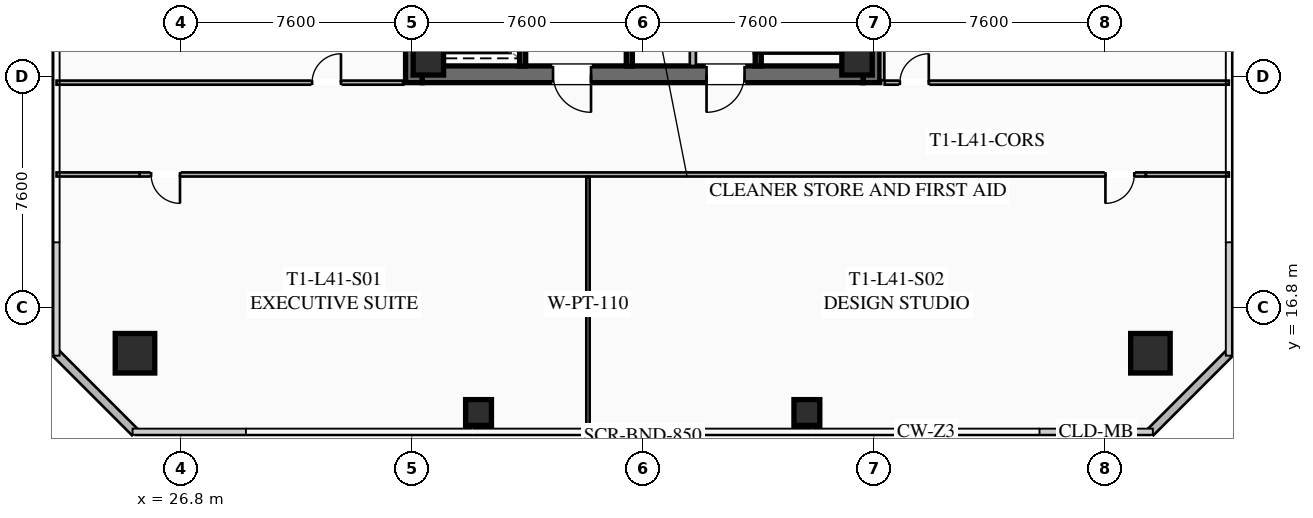
"""IFC4 building model, lengths in metres.
Left out: names, types, materials, properties, quantities, classifications, styles, units other than length and angle.
Written with IfcOpenShell. Run it as: python <this file> out.ifc"""

import sys

from ifc_helpers import new_model, si_unit, direction, frame, frame_2d, origin, origin_2d, place, context, subcontext, project, spatial, rectangle, hollow_rectangle, extrude, element, fill, save


model = new_model("IFC4")
c1 = context("Model", 3, precision=1e-05, world=origin(), true_north=direction((0.0, 1.0)))
c2 = subcontext(c1, "Body", "Model", "MODEL_VIEW")
j1 = project(units=[si_unit("LENGTHUNIT", "METRE"), si_unit("PLANEANGLEUNIT", "RADIAN")], contexts=[c1])
p1 = place(None, origin())
s1 = spatial("IfcSite", under=j1, at=p1, CompositionType="ELEMENT")
p2 = place(p1, origin())
s2 = spatial("IfcBuilding", under=s1, at=p2, CompositionType="ELEMENT")
p3 = place(p2, frame((0.0, 0.0, 153.45)))
s3 = spatial("IfcBuildingStorey", under=s2, at=p3, CompositionType="ELEMENT", Elevation=153.45)
for number, where, z_axis, x_axis in (
    (1, (34.475, 24.2, 0.0), (0.0, 0.0, 1.0), (0.0, 1.0, 0.0)),
    (2, (49.525, 39.8, 0.0), (0.0, 0.0, 1.0), (0.0, -1.0, 0.0)),
):
    element("IfcWall", number, at=place(p3, frame(where, z_axis=z_axis, x_axis=x_axis)), inside=s3, PredefinedType="SHEAR", context=c2, shape_type="SweptSolid", body=[
        extrude(rectangle(XDim=15.6, YDim=0.55, at=frame_2d((7.8, 0.0))), origin(), (0.0, 0.0, 1.0), 3.55),
    ])
p4 = place(p3, frame((49.25, 24.475, 0.0), z_axis=(0.0, 0.0, 1.0), x_axis=(-1.0, 0.0, 0.0)))
e3 = element("IfcWall", 3, at=p4, inside=s3, PredefinedType="SHEAR", context=c2, shape_type="SweptSolid", body=[
    extrude(rectangle(XDim=14.5, YDim=0.55, at=frame_2d((7.25, 0.0))), origin(), (0.0, 0.0, 1.0), 3.55),
])
p5 = place(p4, frame((8.95, 0.0, 0.0)))
e4 = element("IfcOpeningElement", 4, at=p5, cuts=e3, PredefinedType="OPENING", context=c2, shape_type="SweptSolid", body=[
    extrude(rectangle(XDim=1.25, YDim=2.25, at=frame_2d((0.625, 1.125))), frame((0.0, 0.285, 0.0), z_axis=(0.0, -1.0, 0.0), x_axis=(1.0, 0.0, 0.0)), (0.0, 0.0, 1.0), 0.57),
])
p6 = place(p4, frame((3.9, 0.0, 0.0)))
e5 = element("IfcOpeningElement", 5, at=p6, cuts=e3, PredefinedType="OPENING", context=c2, shape_type="SweptSolid", body=[
    extrude(rectangle(XDim=1.25, YDim=2.25, at=frame_2d((0.625, 1.125))), frame((0.0, 0.285, 0.0), z_axis=(0.0, -1.0, 0.0), x_axis=(1.0, 0.0, 0.0)), (0.0, 0.0, 1.0), 0.57),
])
for number, where, z_axis, x_axis in (
    (6, (34.95, 24.95, 0.0), (0.0, 0.0, 1.0), (1.0, 0.0, 0.0)),
    (7, (49.05, 24.95, 0.0), (0.0, 0.0, 1.0), (1.0, 0.0, 0.0)),
):
    element("IfcColumn", number, at=place(p3, frame(where, z_axis=z_axis, x_axis=x_axis)), inside=s3, PredefinedType="COLUMN", context=c2, shape_type="SweptSolid", body=[
        extrude(hollow_rectangle(XDim=1.0, YDim=1.0, WallThickness=0.04, at=origin_2d()), origin(), (0.0, 0.0, 1.0), 3.37),
    ])
for number, where, z_axis, x_axis in (
    (8, (25.3, 15.3, 0.0), (0.0, 0.0, 1.0), (1.0, 0.0, 0.0)),
    (9, (58.7, 15.3, 0.0), (0.0, 0.0, 1.0), (1.0, 0.0, 0.0)),
):
    element("IfcColumn", number, at=place(p3, frame(where, z_axis=z_axis, x_axis=x_axis)), inside=s3, PredefinedType="COLUMN", context=c2, shape_type="SweptSolid", body=[
        extrude(hollow_rectangle(XDim=1.3, YDim=1.3, WallThickness=0.05, at=origin_2d()), origin(), (0.0, 0.0, 1.0), 3.37),
    ])
for number, where, z_axis, x_axis in (
    (10, (36.6, 13.35, 0.0), (0.0, 0.0, 1.0), (1.0, 0.0, 0.0)),
    (11, (47.4, 13.35, 0.0), (0.0, 0.0, 1.0), (1.0, 0.0, 0.0)),
):
    element("IfcColumn", number, at=place(p3, frame(where, z_axis=z_axis, x_axis=x_axis)), inside=s3, PredefinedType="COLUMN", context=c2, shape_type="SweptSolid", body=[
        extrude(hollow_rectangle(XDim=0.85, YDim=0.85, WallThickness=0.035, at=origin_2d()), origin(), (0.0, 0.0, 1.0), 3.37),
    ])
for number, where, z_axis, x_axis in (
    (12, (25.3, 12.7, 0.0), (0.0, 0.0, 1.0), (-0.707, 0.707, 0.0)),
    (13, (61.3, 15.3, 0.0), (0.0, 0.0, 1.0), (-0.707, -0.707, 0.0)),
):
    element("IfcWall", number, at=place(p3, frame(where, z_axis=z_axis, x_axis=x_axis)), inside=s3, PredefinedType="SOLIDWALL", context=c2, shape_type="SweptSolid", body=[
        extrude(rectangle(XDim=3.677, YDim=0.28, at=frame_2d((1.838, 0.0))), origin(), (0.0, 0.0, 1.0), 3.37),
    ])
p7 = place(p3, frame((45.8, 32.8, 0.0), z_axis=(0.0, 0.0, 1.0), x_axis=(0.0, -1.0, 0.0)))
e14 = element("IfcWall", 14, at=p7, inside=s3, PredefinedType="SHEAR", context=c2, shape_type="SweptSolid", body=[
    extrude(rectangle(XDim=8.05, YDim=0.2, at=frame_2d((4.025, 0.0))), origin(), (0.0, 0.0, 1.0), 3.37),
])
p8 = place(p7, frame((0.45, 0.0, 0.0)))
e15 = element("IfcOpeningElement", 15, at=p8, cuts=e14, PredefinedType="OPENING", context=c2, shape_type="SweptSolid", body=[
    extrude(rectangle(XDim=1.15, YDim=2.2, at=frame_2d((0.575, 1.1))), frame((0.0, 0.11, 0.0), z_axis=(0.0, -1.0, 0.0), x_axis=(1.0, 0.0, 0.0)), (0.0, 0.0, 1.0), 0.22),
])
p9 = place(p3, frame((41.56, 24.75, 0.0), z_axis=(0.0, 0.0, 1.0), x_axis=(0.0, 1.0, 0.0)))
e16 = element("IfcWall", 16, at=p9, inside=s3, PredefinedType="SHEAR", context=c2, shape_type="SweptSolid", body=[
    extrude(rectangle(XDim=14.5, YDim=0.2, at=frame_2d((7.25, 0.0))), origin(), (0.0, 0.0, 1.0), 3.37),
])
p10 = place(p3, frame((38.05, 24.75, 0.0), z_axis=(0.0, 0.0, 1.0), x_axis=(0.0, 1.0, 0.0)))
e17 = element("IfcWall", 17, at=p10, inside=s3, PredefinedType="SHEAR", context=c2, shape_type="SweptSolid", body=[
    extrude(rectangle(XDim=6.45, YDim=0.2, at=frame_2d((3.225, 0.0))), origin(), (0.0, 0.0, 1.0), 3.37),
])
p11 = place(p10, frame((4.875, 0.0, 0.0)))
e18 = element("IfcOpeningElement", 18, at=p11, cuts=e17, PredefinedType="OPENING", context=c2, shape_type="SweptSolid", body=[
    extrude(rectangle(XDim=1.3, YDim=2.25, at=frame_2d((0.65, 1.125))), frame((0.0, 0.11, 0.0), z_axis=(0.0, -1.0, 0.0), x_axis=(1.0, 0.0, 0.0)), (0.0, 0.0, 1.0), 0.22),
])
p12 = place(p10, frame((2.875, 0.0, 0.0)))
e19 = element("IfcOpeningElement", 19, at=p12, cuts=e17, PredefinedType="OPENING", context=c2, shape_type="SweptSolid", body=[
    extrude(rectangle(XDim=1.3, YDim=2.25, at=frame_2d((0.65, 1.125))), frame((0.0, 0.11, 0.0), z_axis=(0.0, -1.0, 0.0), x_axis=(1.0, 0.0, 0.0)), (0.0, 0.0, 1.0), 0.22),
])
p13 = place(p10, frame((0.675, 0.0, 0.0)))
e20 = element("IfcOpeningElement", 20, at=p13, cuts=e17, PredefinedType="OPENING", context=c2, shape_type="SweptSolid", body=[
    extrude(rectangle(XDim=1.3, YDim=2.25, at=frame_2d((0.65, 1.125))), frame((0.0, 0.11, 0.0), z_axis=(0.0, -1.0, 0.0), x_axis=(1.0, 0.0, 0.0)), (0.0, 0.0, 1.0), 0.22),
])
p14 = place(p3, frame((43.65, 24.75, 0.0), z_axis=(0.0, 0.0, 1.0), x_axis=(0.0, 1.0, 0.0)))
e21 = element("IfcWall", 21, at=p14, inside=s3, PredefinedType="SOLIDWALL", context=c2, shape_type="SweptSolid", body=[
    extrude(rectangle(XDim=6.9, YDim=0.2, at=frame_2d((3.45, 0.0))), origin(), (0.0, 0.0, 1.0), 2.513),
])
p15 = place(p14, frame((0.85, 0.0, 0.0)))
e22 = element("IfcOpeningElement", 22, at=p15, cuts=e21, PredefinedType="OPENING", context=c2, shape_type="SweptSolid", body=[
    extrude(rectangle(XDim=0.95, YDim=2.05, at=frame_2d((0.475, 1.025))), frame((0.0, 0.11, 0.0), z_axis=(0.0, -1.0, 0.0), x_axis=(1.0, 0.0, 0.0)), (0.0, 0.0, 1.0), 0.22),
])
p16 = place(p14, frame((4.8, 0.0, 0.0)))
e23 = element("IfcOpeningElement", 23, at=p16, cuts=e21, PredefinedType="OPENING", context=c2, shape_type="SweptSolid", body=[
    extrude(rectangle(XDim=1.05, YDim=2.2, at=frame_2d((0.525, 1.1))), frame((0.0, 0.11, 0.0), z_axis=(0.0, -1.0, 0.0), x_axis=(1.0, 0.0, 0.0)), (0.0, 0.0, 1.0), 0.22),
])
p17 = place(p3, frame((58.55, 21.18, 0.0), z_axis=(0.0, 0.0, 1.0), x_axis=(-1.0, 0.0, 0.0)))
e24 = element("IfcWall", 24, at=p17, inside=s3, PredefinedType="PARTITIONING", context=c2, shape_type="SweptSolid", body=[
    extrude(rectangle(XDim=33.1, YDim=0.135, at=frame_2d((16.55, 0.0))), origin(), (0.0, 0.0, 1.0), 2.513),
])
p18 = place(p17, frame((31.77, 0.0, 0.0)))
e25 = element("IfcOpeningElement", 25, at=p18, cuts=e24, PredefinedType="OPENING", context=c2, shape_type="SweptSolid", body=[
    extrude(rectangle(XDim=0.95, YDim=2.05, at=frame_2d((0.475, 1.025))), frame((0.0, 0.077, 0.0), z_axis=(0.0, -1.0, 0.0), x_axis=(1.0, 0.0, 0.0)), (0.0, 0.0, 1.0), 0.155),
])
p19 = place(p17, frame((0.38, 0.0, 0.0)))
e26 = element("IfcOpeningElement", 26, at=p19, cuts=e24, PredefinedType="OPENING", context=c2, shape_type="SweptSolid", body=[
    extrude(rectangle(XDim=0.95, YDim=2.05, at=frame_2d((0.475, 1.025))), frame((0.0, 0.077, 0.0), z_axis=(0.0, -1.0, 0.0), x_axis=(1.0, 0.0, 0.0)), (0.0, 0.0, 1.0), 0.155),
])
for number, where, z_axis, x_axis in (
    (27, (22.72, 21.18, 0.0), (0.0, 0.0, 1.0), (1.0, 0.0, 0.0)),
    (28, (58.55, 21.18, 0.0), (0.0, 0.0, 1.0), (1.0, 0.0, 0.0)),
):
    element("IfcWall", number, at=place(p3, frame(where, z_axis=z_axis, x_axis=x_axis)), inside=s3, PredefinedType="PARTITIONING", context=c2, shape_type="SweptSolid", body=[
        extrude(rectangle(XDim=2.73, YDim=0.135, at=frame_2d((1.365, 0.0))), origin(), (0.0, 0.0, 1.0), 2.513),
    ])
p20 = place(p3, frame((40.2, 12.72, 0.0), z_axis=(0.0, 0.0, 1.0), x_axis=(0.0, 1.0, 0.0)))
e29 = element("IfcWall", 29, at=p20, inside=s3, PredefinedType="PARTITIONING", context=c2, shape_type="SweptSolid", body=[
    extrude(rectangle(XDim=8.38, YDim=0.11, at=frame_2d((4.19, 0.0))), origin(), (0.0, 0.0, 1.0), 2.513),
])
p21 = place(p3, frame((49.88, 39.72, 0.0), z_axis=(0.0, 0.0, 1.0), x_axis=(0.0, -1.0, 0.0)))
e30 = element("IfcWall", 30, at=p21, inside=s3, PredefinedType="PARTITIONING", context=c2, shape_type="SweptSolid", body=[
    extrude(rectangle(XDim=15.44, YDim=0.135, at=frame_2d((7.72, 0.0))), origin(), (0.0, 0.0, 1.0), 2.513),
])
p22 = place(p3, frame((49.96, 24.2, 0.0), z_axis=(0.0, 0.0, 1.0), x_axis=(1.0, 0.0, 0.0)))
e31 = element("IfcWall", 31, at=p22, inside=s3, PredefinedType="PARTITIONING", context=c2, shape_type="SweptSolid", body=[
    extrude(rectangle(XDim=11.32, YDim=0.135, at=frame_2d((5.66, 0.0))), origin(), (0.0, 0.0, 1.0), 2.513),
])
p23 = place(p22, frame((0.5, 0.0, 0.0)))
e32 = element("IfcOpeningElement", 32, at=p23, cuts=e31, PredefinedType="OPENING", context=c2, shape_type="SweptSolid", body=[
    extrude(rectangle(XDim=0.95, YDim=2.05, at=frame_2d((0.475, 1.025))), frame((0.0, 0.077, 0.0), z_axis=(0.0, -1.0, 0.0), x_axis=(1.0, 0.0, 0.0)), (0.0, 0.0, 1.0), 0.155),
])
p24 = place(p3, frame((22.72, 24.2, 0.0), z_axis=(0.0, 0.0, 1.0), x_axis=(1.0, 0.0, 0.0)))
e33 = element("IfcWall", 33, at=p24, inside=s3, PredefinedType="PARTITIONING", context=c2, shape_type="SweptSolid", body=[
    extrude(rectangle(XDim=11.4, YDim=0.135, at=frame_2d((5.7, 0.0))), origin(), (0.0, 0.0, 1.0), 2.513),
])
p25 = place(p24, frame((8.405, 0.0, 0.0)))
e34 = element("IfcOpeningElement", 34, at=p25, cuts=e33, PredefinedType="OPENING", context=c2, shape_type="SweptSolid", body=[
    extrude(rectangle(XDim=0.95, YDim=2.05, at=frame_2d((0.475, 1.025))), frame((0.0, 0.077, 0.0), z_axis=(0.0, -1.0, 0.0), x_axis=(1.0, 0.0, 0.0)), (0.0, 0.0, 1.0), 0.155),
])
p26 = place(p5, origin())
e35 = element("IfcDoor", 35, at=p26, inside=s3, OperationType="SINGLE_SWING_LEFT", PredefinedType="DOOR", context=c2, shape_type="SweptSolid", body=[
    extrude(rectangle(XDim=1.25, YDim=2.25, at=frame_2d((0.625, 1.125))), frame((0.0, 0.025, 0.0), z_axis=(0.0, -1.0, 0.0), x_axis=(1.0, 0.0, 0.0)), (0.0, 0.0, 1.0), 0.05),
])
fill(e4, e35)
p27 = place(p6, origin())
e36 = element("IfcDoor", 36, at=p27, inside=s3, OperationType="SINGLE_SWING_RIGHT", PredefinedType="DOOR", context=c2, shape_type="SweptSolid", body=[
    extrude(rectangle(XDim=1.25, YDim=2.25, at=frame_2d((0.625, 1.125))), frame((0.0, 0.025, 0.0), z_axis=(0.0, -1.0, 0.0), x_axis=(1.0, 0.0, 0.0)), (0.0, 0.0, 1.0), 0.05),
])
fill(e5, e36)
p28 = place(p18, origin())
e37 = element("IfcDoor", 37, at=p28, inside=s3, OperationType="SINGLE_SWING_LEFT", PredefinedType="DOOR", context=c2, shape_type="SweptSolid", body=[
    extrude(rectangle(XDim=0.95, YDim=2.05, at=frame_2d((0.475, 1.025))), frame((0.0, 0.025, 0.0), z_axis=(0.0, -1.0, 0.0), x_axis=(1.0, 0.0, 0.0)), (0.0, 0.0, 1.0), 0.05),
])
fill(e25, e37)
p29 = place(p19, origin())
e38 = element("IfcDoor", 38, at=p29, inside=s3, OperationType="SINGLE_SWING_RIGHT", PredefinedType="DOOR", context=c2, shape_type="SweptSolid", body=[
    extrude(rectangle(XDim=0.95, YDim=2.05, at=frame_2d((0.475, 1.025))), frame((0.0, 0.025, 0.0), z_axis=(0.0, -1.0, 0.0), x_axis=(1.0, 0.0, 0.0)), (0.0, 0.0, 1.0), 0.05),
])
fill(e26, e38)
p30 = place(p23, origin())
e39 = element("IfcDoor", 39, at=p30, inside=s3, OperationType="SINGLE_SWING_RIGHT", PredefinedType="DOOR", context=c2, shape_type="SweptSolid", body=[
    extrude(rectangle(XDim=0.95, YDim=2.05, at=frame_2d((0.475, 1.025))), frame((0.0, 0.025, 0.0), z_axis=(0.0, -1.0, 0.0), x_axis=(1.0, 0.0, 0.0)), (0.0, 0.0, 1.0), 0.05),
])
fill(e32, e39)
p31 = place(p25, origin())
e40 = element("IfcDoor", 40, at=p31, inside=s3, OperationType="SINGLE_SWING_RIGHT", PredefinedType="DOOR", context=c2, shape_type="SweptSolid", body=[
    extrude(rectangle(XDim=0.95, YDim=2.05, at=frame_2d((0.475, 1.025))), frame((0.0, 0.025, 0.0), z_axis=(0.0, -1.0, 0.0), x_axis=(1.0, 0.0, 0.0)), (0.0, 0.0, 1.0), 0.05),
])
fill(e34, e40)
save(model, sys.argv[1])
